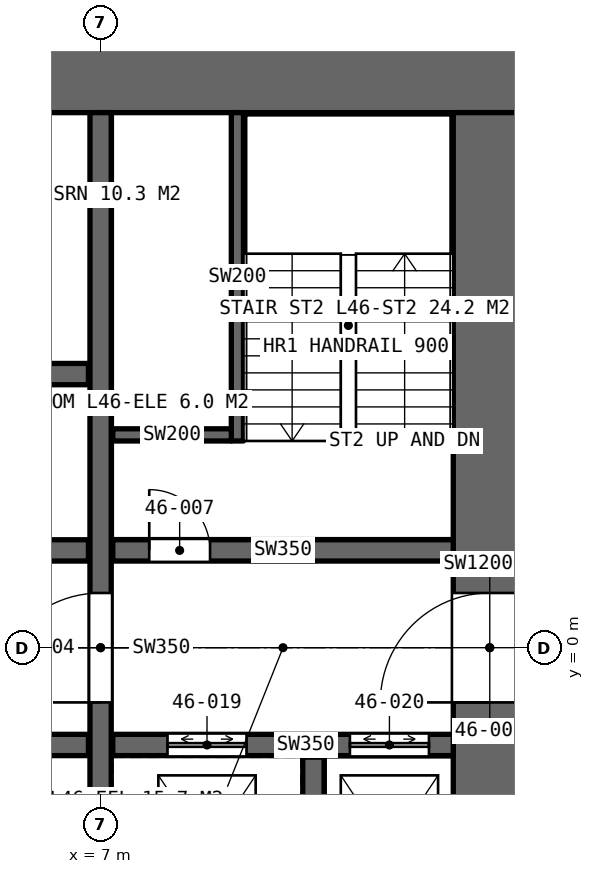
"""IFC4 building model, lengths in metres.
Left out: names, types, materials, properties, quantities, classifications, styles, units other than length and angle.
Written with IfcOpenShell. Run it as: python <this file> out.ifc"""

import sys

from ifc_helpers import new_model, si_unit, direction, frame, frame_2d, origin, place, context, subcontext, project, spatial, rectangle, extrude, element, fill, save


model = new_model("IFC4")
c1 = context("Model", 3, precision=1e-05, world=origin(), true_north=direction((0.0, 1.0)))
c2 = subcontext(c1, "Body", "Model", "MODEL_VIEW")
j1 = project(units=[si_unit("LENGTHUNIT", "METRE"), si_unit("PLANEANGLEUNIT", "RADIAN")], contexts=[c1])
p1 = place(None, origin())
s1 = spatial("IfcSite", under=j1, at=p1, CompositionType="ELEMENT")
p2 = place(p1, origin())
s2 = spatial("IfcBuilding", under=s1, at=p2, CompositionType="ELEMENT")
p3 = place(p2, frame((0.0, 0.0, 211.6)))
s3 = spatial("IfcBuildingStorey", under=s2, at=p3, CompositionType="ELEMENT", Elevation=211.6)
p4 = place(p3, frame((14.0, 9.4, 0.0), z_axis=(0.0, 0.0, 1.0), x_axis=(-1.0, 0.0, 0.0)))
e1 = element("IfcWall", 1, at=p4, inside=s3, PredefinedType="SHEAR", context=c2, shape_type="SweptSolid", body=[
    extrude(rectangle(XDim=28.0, YDim=1.2, at=frame_2d((14.0, 0.0))), origin(), (0.0, 0.0, 1.0), 4.2),
])
p5 = place(p4, frame((24.0, 0.0, 0.0)))
e2 = element("IfcOpeningElement", 2, at=p5, cuts=e1, PredefinedType="OPENING", context=c2, shape_type="SweptSolid", body=[
    extrude(rectangle(XDim=1.0, YDim=2.4, at=frame_2d((0.5, 1.2))), frame((0.0, 0.61, 0.0), z_axis=(0.0, -1.0, 0.0), x_axis=(1.0, 0.0, 0.0)), (0.0, 0.0, 1.0), 1.22),
])
p6 = place(p3, frame((13.4, -8.8, 0.0), z_axis=(0.0, 0.0, 1.0), x_axis=(0.0, 1.0, 0.0)))
e3 = element("IfcWall", 3, at=p6, inside=s3, PredefinedType="SHEAR", context=c2, shape_type="SweptSolid", body=[
    extrude(rectangle(XDim=17.6, YDim=1.2, at=frame_2d((8.8, 0.0))), origin(), (0.0, 0.0, 1.0), 4.2),
])
p7 = place(p6, frame((7.9, 0.0, 0.0)))
e4 = element("IfcOpeningElement", 4, at=p7, cuts=e3, PredefinedType="OPENING", context=c2, shape_type="SweptSolid", body=[
    extrude(rectangle(XDim=1.8, YDim=2.4, at=frame_2d((0.9, 1.2))), frame((0.0, 0.61, 0.0), z_axis=(0.0, -1.0, 0.0), x_axis=(1.0, 0.0, 0.0)), (0.0, 0.0, 1.0), 1.22),
])
p8 = place(p3, frame((7.0, -8.8, 0.0), z_axis=(0.0, 0.0, 1.0), x_axis=(0.0, 1.0, 0.0)))
e5 = element("IfcWall", 5, at=p8, inside=s3, PredefinedType="SHEAR", context=c2, shape_type="SweptSolid", body=[
    extrude(rectangle(XDim=17.6, YDim=0.35, at=frame_2d((8.8, 0.0))), origin(), (0.0, 0.0, 1.0), 4.2),
])
p9 = place(p8, frame((7.9, 0.0, 0.0)))
e6 = element("IfcOpeningElement", 6, at=p9, cuts=e5, PredefinedType="OPENING", context=c2, shape_type="SweptSolid", body=[
    extrude(rectangle(XDim=1.8, YDim=2.4, at=frame_2d((0.9, 1.2))), frame((0.0, 0.185, 0.0), z_axis=(0.0, -1.0, 0.0), x_axis=(1.0, 0.0, 0.0)), (0.0, 0.0, 1.0), 0.37),
])
p10 = place(p3, frame((-6.8, 1.6, 0.0), z_axis=(0.0, 0.0, 1.0), x_axis=(1.0, 0.0, 0.0)))
e7 = element("IfcWall", 7, at=p10, inside=s3, PredefinedType="SHEAR", context=c2, shape_type="SweptSolid", body=[
    extrude(rectangle(XDim=13.6, YDim=0.35, at=frame_2d((6.8, 0.0))), origin(), (0.0, 0.0, 1.0), 4.2),
])
p11 = place(p10, frame((11.9, 0.0, 0.0)))
e8 = element("IfcOpeningElement", 8, at=p11, cuts=e7, PredefinedType="OPENING", context=c2, shape_type="SweptSolid", body=[
    extrude(rectangle(XDim=1.0, YDim=2.4, at=frame_2d((0.5, 1.2))), frame((0.0, 0.185, 0.0), z_axis=(0.0, -1.0, 0.0), x_axis=(1.0, 0.0, 0.0)), (0.0, 0.0, 1.0), 0.37),
])
p12 = place(p10, frame((4.5, 0.0, 0.0)))
e9 = element("IfcOpeningElement", 9, at=p12, cuts=e7, PredefinedType="OPENING", context=c2, shape_type="SweptSolid", body=[
    extrude(rectangle(XDim=1.8, YDim=2.4, at=frame_2d((0.9, 1.2))), frame((0.0, 0.185, 0.0), z_axis=(0.0, -1.0, 0.0), x_axis=(1.0, 0.0, 0.0)), (0.0, 0.0, 1.0), 0.37),
])
p13 = place(p3, frame((-6.8, -1.6, 0.0), z_axis=(0.0, 0.0, 1.0), x_axis=(1.0, 0.0, 0.0)))
e10 = element("IfcWall", 10, at=p13, inside=s3, PredefinedType="SHEAR", context=c2, shape_type="SweptSolid", body=[
    extrude(rectangle(XDim=13.6, YDim=0.35, at=frame_2d((6.8, 0.0))), origin(), (0.0, 0.0, 1.0), 4.2),
])
p14 = place(p13, frame((0.415, 0.0, 0.0)))
e11 = element("IfcOpeningElement", 11, at=p14, cuts=e10, PredefinedType="OPENING", context=c2, shape_type="SweptSolid", body=[
    extrude(rectangle(XDim=0.9, YDim=2.4, at=frame_2d((0.45, 1.2))), frame((0.0, 0.185, 0.0), z_axis=(0.0, -1.0, 0.0), x_axis=(1.0, 0.0, 0.0)), (0.0, 0.0, 1.0), 0.37),
])
p15 = place(p13, frame((3.1, 0.0, 0.0)))
e12 = element("IfcOpeningElement", 12, at=p15, cuts=e10, PredefinedType="OPENING", context=c2, shape_type="SweptSolid", body=[
    extrude(rectangle(XDim=1.0, YDim=2.4, at=frame_2d((0.5, 1.2))), frame((0.0, 0.185, 0.0), z_axis=(0.0, -1.0, 0.0), x_axis=(1.0, 0.0, 0.0)), (0.0, 0.0, 1.0), 0.37),
])
p16 = place(p13, frame((6.7, 0.0, 0.0)))
e13 = element("IfcOpeningElement", 13, at=p16, cuts=e10, PredefinedType="OPENING", context=c2, shape_type="SweptSolid", body=[
    extrude(rectangle(XDim=1.0, YDim=2.4, at=frame_2d((0.5, 1.2))), frame((0.0, 0.185, 0.0), z_axis=(0.0, -1.0, 0.0), x_axis=(1.0, 0.0, 0.0)), (0.0, 0.0, 1.0), 0.37),
])
p17 = place(p13, frame((9.435, 0.0, 0.0)))
e14 = element("IfcOpeningElement", 14, at=p17, cuts=e10, PredefinedType="OPENING", context=c2, shape_type="SweptSolid", body=[
    extrude(rectangle(XDim=1.0, YDim=2.4, at=frame_2d((0.5, 1.2))), frame((0.0, 0.185, 0.0), z_axis=(0.0, -1.0, 0.0), x_axis=(1.0, 0.0, 0.0)), (0.0, 0.0, 1.0), 0.37),
])
p18 = place(p13, frame((11.85, 0.0, 0.0)))
e15 = element("IfcOpeningElement", 15, at=p18, cuts=e10, PredefinedType="OPENING", context=c2, shape_type="SweptSolid", body=[
    extrude(rectangle(XDim=1.1, YDim=2.4, at=frame_2d((0.55, 1.2))), frame((0.0, 0.185, 0.0), z_axis=(0.0, -1.0, 0.0), x_axis=(1.0, 0.0, 0.0)), (0.0, 0.0, 1.0), 0.37),
])
p19 = place(p3, frame((-6.8, 4.5, 0.0), z_axis=(0.0, 0.0, 1.0), x_axis=(1.0, 0.0, 0.0)))
e16 = element("IfcWall", 16, at=p19, inside=s3, PredefinedType="SHEAR", context=c2, shape_type="SweptSolid", body=[
    extrude(rectangle(XDim=13.6, YDim=0.35, at=frame_2d((6.8, 0.0))), origin(), (0.0, 0.0, 1.0), 4.2),
])
p20 = place(p19, frame((0.7, 0.0, 0.0)))
e17 = element("IfcOpeningElement", 17, at=p20, cuts=e16, PredefinedType="OPENING", context=c2, shape_type="SweptSolid", body=[
    extrude(rectangle(XDim=1.1, YDim=2.4, at=frame_2d((0.55, 1.2))), frame((0.0, 0.185, 0.0), z_axis=(0.0, -1.0, 0.0), x_axis=(1.0, 0.0, 0.0)), (0.0, 0.0, 1.0), 0.37),
])
p21 = place(p19, frame((3.5, 0.0, 0.0)))
e18 = element("IfcOpeningElement", 18, at=p21, cuts=e16, PredefinedType="OPENING", context=c2, shape_type="SweptSolid", body=[
    extrude(rectangle(XDim=1.1, YDim=2.4, at=frame_2d((0.55, 1.2))), frame((0.0, 0.185, 0.0), z_axis=(0.0, -1.0, 0.0), x_axis=(1.0, 0.0, 0.0)), (0.0, 0.0, 1.0), 0.37),
])
p22 = place(p19, frame((6.3, 0.0, 0.0)))
e19 = element("IfcOpeningElement", 19, at=p22, cuts=e16, PredefinedType="OPENING", context=c2, shape_type="SweptSolid", body=[
    extrude(rectangle(XDim=1.1, YDim=2.4, at=frame_2d((0.55, 1.2))), frame((0.0, 0.185, 0.0), z_axis=(0.0, -1.0, 0.0), x_axis=(1.0, 0.0, 0.0)), (0.0, 0.0, 1.0), 0.37),
])
p23 = place(p19, frame((9.1, 0.0, 0.0)))
e20 = element("IfcOpeningElement", 20, at=p23, cuts=e16, PredefinedType="OPENING", context=c2, shape_type="SweptSolid", body=[
    extrude(rectangle(XDim=1.1, YDim=2.4, at=frame_2d((0.55, 1.2))), frame((0.0, 0.185, 0.0), z_axis=(0.0, -1.0, 0.0), x_axis=(1.0, 0.0, 0.0)), (0.0, 0.0, 1.0), 0.37),
])
p24 = place(p3, frame((7.2, 1.6, 0.0), z_axis=(0.0, 0.0, 1.0), x_axis=(1.0, 0.0, 0.0)))
e21 = element("IfcWall", 21, at=p24, inside=s3, PredefinedType="SHEAR", context=c2, shape_type="SweptSolid", body=[
    extrude(rectangle(XDim=5.6, YDim=0.35, at=frame_2d((2.8, 0.0))), origin(), (0.0, 0.0, 1.0), 4.2),
])
p25 = place(p24, frame((0.6, 0.0, 0.0)))
e22 = element("IfcOpeningElement", 22, at=p25, cuts=e21, PredefinedType="OPENING", context=c2, shape_type="SweptSolid", body=[
    extrude(rectangle(XDim=1.0, YDim=2.4, at=frame_2d((0.5, 1.2))), frame((0.0, 0.185, 0.0), z_axis=(0.0, -1.0, 0.0), x_axis=(1.0, 0.0, 0.0)), (0.0, 0.0, 1.0), 0.37),
])
p26 = place(p3, frame((7.2, -1.6, 0.0), z_axis=(0.0, 0.0, 1.0), x_axis=(1.0, 0.0, 0.0)))
e23 = element("IfcWall", 23, at=p26, inside=s3, PredefinedType="SHEAR", context=c2, shape_type="SweptSolid", body=[
    extrude(rectangle(XDim=5.6, YDim=0.35, at=frame_2d((2.8, 0.0))), origin(), (0.0, 0.0, 1.0), 4.2),
])
p27 = place(p26, frame((0.9, 0.0, 0.0)))
e24 = element("IfcOpeningElement", 24, at=p27, cuts=e23, PredefinedType="OPENING", context=c2, shape_type="SweptSolid", body=[
    extrude(rectangle(XDim=1.3, YDim=2.4, at=frame_2d((0.65, 1.2))), frame((0.0, 0.185, 0.0), z_axis=(0.0, -1.0, 0.0), x_axis=(1.0, 0.0, 0.0)), (0.0, 0.0, 1.0), 0.37),
])
p28 = place(p26, frame((3.9, 0.0, 0.0)))
e25 = element("IfcOpeningElement", 25, at=p28, cuts=e23, PredefinedType="OPENING", context=c2, shape_type="SweptSolid", body=[
    extrude(rectangle(XDim=1.3, YDim=2.4, at=frame_2d((0.65, 1.2))), frame((0.0, 0.185, 0.0), z_axis=(0.0, -1.0, 0.0), x_axis=(1.0, 0.0, 0.0)), (0.0, 0.0, 1.0), 0.37),
])
p29 = place(p3, frame((10.5, -4.8, 0.0), z_axis=(0.0, 0.0, 1.0), x_axis=(0.0, 1.0, 0.0)))
e26 = element("IfcWall", 26, at=p29, inside=s3, PredefinedType="SHEAR", context=c2, shape_type="SweptSolid", body=[
    extrude(rectangle(XDim=3.0, YDim=0.35, at=frame_2d((1.5, 0.0))), origin(), (0.0, 0.0, 1.0), 4.2),
])
p30 = place(p3, frame((9.25, 3.4, 0.0), z_axis=(0.0, 0.0, 1.0), x_axis=(0.0, 1.0, 0.0)))
e27 = element("IfcWall", 27, at=p30, inside=s3, PredefinedType="SOLIDWALL", context=c2, shape_type="SweptSolid", body=[
    extrude(rectangle(XDim=5.4, YDim=0.2, at=frame_2d((2.7, 0.0))), origin(), (0.0, 0.0, 1.0), 4.2),
])
p31 = place(p3, frame((9.15, 3.5, 0.0), z_axis=(0.0, 0.0, 1.0), x_axis=(-1.0, 0.0, 0.0)))
e28 = element("IfcWall", 28, at=p31, inside=s3, PredefinedType="SOLIDWALL", context=c2, shape_type="SweptSolid", body=[
    extrude(rectangle(XDim=1.95, YDim=0.2, at=frame_2d((0.975, 0.0))), origin(), (0.0, 0.0, 1.0), 4.2),
])
p32 = place(p7, origin())
e29 = element("IfcDoor", 29, at=p32, inside=s3, OperationType="DOUBLE_DOOR_SINGLE_SWING", PredefinedType="DOOR", context=c2, shape_type="SweptSolid", body=[
    extrude(rectangle(XDim=1.8, YDim=2.4, at=frame_2d((0.9, 1.2))), frame((0.0, 0.025, 0.0), z_axis=(0.0, -1.0, 0.0), x_axis=(1.0, 0.0, 0.0)), (0.0, 0.0, 1.0), 0.05),
])
fill(e4, e29)
p33 = place(p9, origin())
e30 = element("IfcDoor", 30, at=p33, inside=s3, OperationType="DOUBLE_DOOR_SINGLE_SWING", PredefinedType="DOOR", context=c2, shape_type="SweptSolid", body=[
    extrude(rectangle(XDim=1.8, YDim=2.4, at=frame_2d((0.9, 1.2))), frame((0.0, 0.025, 0.0), z_axis=(0.0, -1.0, 0.0), x_axis=(1.0, 0.0, 0.0)), (0.0, 0.0, 1.0), 0.05),
])
fill(e6, e30)
p34 = place(p25, origin())
e31 = element("IfcDoor", 31, at=p34, inside=s3, OperationType="SINGLE_SWING_LEFT", PredefinedType="DOOR", context=c2, shape_type="SweptSolid", body=[
    extrude(rectangle(XDim=1.0, YDim=2.4, at=frame_2d((0.5, 1.2))), frame((0.0, 0.025, 0.0), z_axis=(0.0, -1.0, 0.0), x_axis=(1.0, 0.0, 0.0)), (0.0, 0.0, 1.0), 0.05),
])
fill(e22, e31)
p35 = place(p27, origin())
e32 = element("IfcDoor", 32, at=p35, inside=s3, OperationType="DOUBLE_DOOR_SLIDING", PredefinedType="DOOR", context=c2, shape_type="SweptSolid", body=[
    extrude(rectangle(XDim=1.3, YDim=2.4, at=frame_2d((0.65, 1.2))), frame((0.0, 0.025, 0.0), z_axis=(0.0, -1.0, 0.0), x_axis=(1.0, 0.0, 0.0)), (0.0, 0.0, 1.0), 0.05),
])
fill(e24, e32)
p36 = place(p28, origin())
e33 = element("IfcDoor", 33, at=p36, inside=s3, OperationType="DOUBLE_DOOR_SLIDING", PredefinedType="DOOR", context=c2, shape_type="SweptSolid", body=[
    extrude(rectangle(XDim=1.3, YDim=2.4, at=frame_2d((0.65, 1.2))), frame((0.0, 0.025, 0.0), z_axis=(0.0, -1.0, 0.0), x_axis=(1.0, 0.0, 0.0)), (0.0, 0.0, 1.0), 0.05),
])
fill(e25, e33)
save(model, sys.argv[1])
